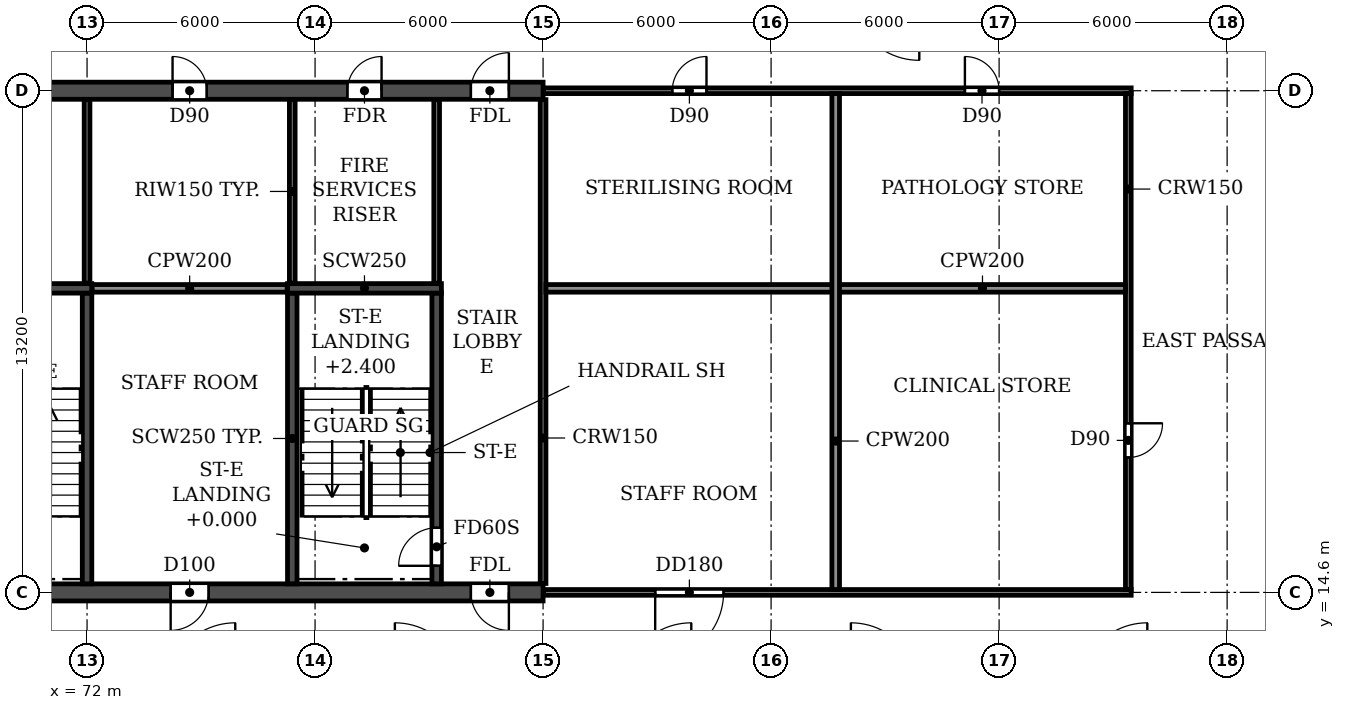
"""IFC4 building model, lengths in metres.
Left out: names, types, materials, properties, quantities, classifications, styles, units other than length and angle.
Written with IfcOpenShell. Run it as: python <this file> out.ifc"""

import sys

from ifc_helpers import new_model, si_unit, direction, frame, frame_2d, origin, place, context, subcontext, project, spatial, rectangle, extrude, element, fill, save


model = new_model("IFC4")
c1 = context("Model", 3, precision=1e-05, world=origin(), true_north=direction((0.0, 1.0)))
c2 = subcontext(c1, "Body", "Model", "MODEL_VIEW")
j1 = project(units=[si_unit("LENGTHUNIT", "METRE"), si_unit("PLANEANGLEUNIT", "RADIAN")], contexts=[c1])
p1 = place(None, origin())
s1 = spatial("IfcSite", under=j1, at=p1, CompositionType="ELEMENT")
p2 = place(p1, origin())
s2 = spatial("IfcBuilding", under=s1, at=p2, CompositionType="ELEMENT")
p3 = place(p2, frame((0.0, 0.0, 6.0)))
s3 = spatial("IfcBuildingStorey", under=s2, at=p3, CompositionType="ELEMENT", Elevation=6.0)
p4 = place(p3, frame((18.0, 14.6, 0.0), z_axis=(0.0, 0.0, 1.0), x_axis=(1.0, 0.0, 0.0)))
e1 = element("IfcWall", 1, at=p4, inside=s3, PredefinedType="SOLIDWALL", context=c2, shape_type="SweptSolid", body=[
    extrude(rectangle(XDim=66.0, YDim=0.45, at=frame_2d((33.0, 0.0))), origin(), (0.0, 0.0, 1.0), 4.52),
])
p5 = place(p4, frame((0.9, 0.0, 0.0)))
e2 = element("IfcOpeningElement", 2, at=p5, cuts=e1, PredefinedType="OPENING", context=c2, shape_type="SweptSolid", body=[
    extrude(rectangle(XDim=1.0, YDim=2.1, at=frame_2d((0.5, 1.05))), frame((0.0, 0.235, 0.0), z_axis=(0.0, -1.0, 0.0), x_axis=(1.0, 0.0, 0.0)), (0.0, 0.0, 1.0), 0.47),
])
p6 = place(p4, frame((8.8, 0.0, 0.0)))
e3 = element("IfcOpeningElement", 3, at=p6, cuts=e1, PredefinedType="OPENING", context=c2, shape_type="SweptSolid", body=[
    extrude(rectangle(XDim=1.0, YDim=2.1, at=frame_2d((0.5, 1.05))), frame((0.0, 0.235, 0.0), z_axis=(0.0, -1.0, 0.0), x_axis=(1.0, 0.0, 0.0)), (0.0, 0.0, 1.0), 0.47),
])
p7 = place(p4, frame((13.4, 0.0, 0.0)))
e4 = element("IfcOpeningElement", 4, at=p7, cuts=e1, PredefinedType="OPENING", context=c2, shape_type="SweptSolid", body=[
    extrude(rectangle(XDim=1.0, YDim=2.1, at=frame_2d((0.5, 1.05))), frame((0.0, 0.235, 0.0), z_axis=(0.0, -1.0, 0.0), x_axis=(1.0, 0.0, 0.0)), (0.0, 0.0, 1.0), 0.47),
])
p8 = place(p4, frame((26.0, 0.0, 0.0)))
e5 = element("IfcOpeningElement", 5, at=p8, cuts=e1, PredefinedType="OPENING", context=c2, shape_type="SweptSolid", body=[
    extrude(rectangle(XDim=1.0, YDim=2.1, at=frame_2d((0.5, 1.05))), frame((0.0, 0.235, 0.0), z_axis=(0.0, -1.0, 0.0), x_axis=(1.0, 0.0, 0.0)), (0.0, 0.0, 1.0), 0.47),
])
p9 = place(p4, frame((29.9, 0.0, 0.0)))
e6 = element("IfcOpeningElement", 6, at=p9, cuts=e1, PredefinedType="OPENING", context=c2, shape_type="SweptSolid", body=[
    extrude(rectangle(XDim=1.0, YDim=2.1, at=frame_2d((0.5, 1.05))), frame((0.0, 0.235, 0.0), z_axis=(0.0, -1.0, 0.0), x_axis=(1.0, 0.0, 0.0)), (0.0, 0.0, 1.0), 0.47),
])
p10 = place(p4, frame((32.5, 0.0, 0.0)))
e7 = element("IfcOpeningElement", 7, at=p10, cuts=e1, PredefinedType="OPENING", context=c2, shape_type="SweptSolid", body=[
    extrude(rectangle(XDim=1.0, YDim=2.1, at=frame_2d((0.5, 1.05))), frame((0.0, 0.235, 0.0), z_axis=(0.0, -1.0, 0.0), x_axis=(1.0, 0.0, 0.0)), (0.0, 0.0, 1.0), 0.47),
])
p11 = place(p4, frame((37.7, 0.0, 0.0)))
e8 = element("IfcOpeningElement", 8, at=p11, cuts=e1, PredefinedType="OPENING", context=c2, shape_type="SweptSolid", body=[
    extrude(rectangle(XDim=1.0, YDim=2.1, at=frame_2d((0.5, 1.05))), frame((0.0, 0.235, 0.0), z_axis=(0.0, -1.0, 0.0), x_axis=(1.0, 0.0, 0.0)), (0.0, 0.0, 1.0), 0.47),
])
p12 = place(p4, frame((51.6, 0.0, 0.0)))
e9 = element("IfcOpeningElement", 9, at=p12, cuts=e1, PredefinedType="OPENING", context=c2, shape_type="SweptSolid", body=[
    extrude(rectangle(XDim=1.0, YDim=2.1, at=frame_2d((0.5, 1.05))), frame((0.0, 0.235, 0.0), z_axis=(0.0, -1.0, 0.0), x_axis=(1.0, 0.0, 0.0)), (0.0, 0.0, 1.0), 0.47),
])
p13 = place(p4, frame((56.2, 0.0, 0.0)))
e10 = element("IfcOpeningElement", 10, at=p13, cuts=e1, PredefinedType="OPENING", context=c2, shape_type="SweptSolid", body=[
    extrude(rectangle(XDim=1.0, YDim=2.1, at=frame_2d((0.5, 1.05))), frame((0.0, 0.235, 0.0), z_axis=(0.0, -1.0, 0.0), x_axis=(1.0, 0.0, 0.0)), (0.0, 0.0, 1.0), 0.47),
])
p14 = place(p4, frame((64.1, 0.0, 0.0)))
e11 = element("IfcOpeningElement", 11, at=p14, cuts=e1, PredefinedType="OPENING", context=c2, shape_type="SweptSolid", body=[
    extrude(rectangle(XDim=1.0, YDim=2.1, at=frame_2d((0.5, 1.05))), frame((0.0, 0.235, 0.0), z_axis=(0.0, -1.0, 0.0), x_axis=(1.0, 0.0, 0.0)), (0.0, 0.0, 1.0), 0.47),
])
p15 = place(p3, frame((18.0, 27.8, 0.0), z_axis=(0.0, 0.0, 1.0), x_axis=(1.0, 0.0, 0.0)))
e12 = element("IfcWall", 12, at=p15, inside=s3, PredefinedType="SOLIDWALL", context=c2, shape_type="SweptSolid", body=[
    extrude(rectangle(XDim=66.0, YDim=0.45, at=frame_2d((33.0, 0.0))), origin(), (0.0, 0.0, 1.0), 4.52),
])
p16 = place(p15, frame((0.9, 0.0, 0.0)))
e13 = element("IfcOpeningElement", 13, at=p16, cuts=e12, PredefinedType="OPENING", context=c2, shape_type="SweptSolid", body=[
    extrude(rectangle(XDim=1.0, YDim=2.1, at=frame_2d((0.5, 1.05))), frame((0.0, 0.235, 0.0), z_axis=(0.0, -1.0, 0.0), x_axis=(1.0, 0.0, 0.0)), (0.0, 0.0, 1.0), 0.47),
])
p17 = place(p15, frame((4.25, 0.0, 0.0)))
e14 = element("IfcOpeningElement", 14, at=p17, cuts=e12, PredefinedType="OPENING", context=c2, shape_type="SweptSolid", body=[
    extrude(rectangle(XDim=0.9, YDim=2.1, at=frame_2d((0.45, 1.05))), frame((0.0, 0.235, 0.0), z_axis=(0.0, -1.0, 0.0), x_axis=(1.0, 0.0, 0.0)), (0.0, 0.0, 1.0), 0.47),
])
p18 = place(p15, frame((8.85, 0.0, 0.0)))
e15 = element("IfcOpeningElement", 15, at=p18, cuts=e12, PredefinedType="OPENING", context=c2, shape_type="SweptSolid", body=[
    extrude(rectangle(XDim=0.9, YDim=2.1, at=frame_2d((0.45, 1.05))), frame((0.0, 0.235, 0.0), z_axis=(0.0, -1.0, 0.0), x_axis=(1.0, 0.0, 0.0)), (0.0, 0.0, 1.0), 0.47),
])
p19 = place(p15, frame((13.45, 0.0, 0.0)))
e16 = element("IfcOpeningElement", 16, at=p19, cuts=e12, PredefinedType="OPENING", context=c2, shape_type="SweptSolid", body=[
    extrude(rectangle(XDim=0.9, YDim=2.1, at=frame_2d((0.45, 1.05))), frame((0.0, 0.235, 0.0), z_axis=(0.0, -1.0, 0.0), x_axis=(1.0, 0.0, 0.0)), (0.0, 0.0, 1.0), 0.47),
])
p20 = place(p15, frame((17.9, 0.0, 0.0)))
e17 = element("IfcOpeningElement", 17, at=p20, cuts=e12, PredefinedType="OPENING", context=c2, shape_type="SweptSolid", body=[
    extrude(rectangle(XDim=1.0, YDim=2.1, at=frame_2d((0.5, 1.05))), frame((0.0, 0.235, 0.0), z_axis=(0.0, -1.0, 0.0), x_axis=(1.0, 0.0, 0.0)), (0.0, 0.0, 1.0), 0.47),
])
p21 = place(p15, frame((23.1, 0.0, 0.0)))
e18 = element("IfcOpeningElement", 18, at=p21, cuts=e12, PredefinedType="OPENING", context=c2, shape_type="SweptSolid", body=[
    extrude(rectangle(XDim=1.0, YDim=2.1, at=frame_2d((0.5, 1.05))), frame((0.0, 0.235, 0.0), z_axis=(0.0, -1.0, 0.0), x_axis=(1.0, 0.0, 0.0)), (0.0, 0.0, 1.0), 0.47),
])
p22 = place(p15, frame((29.6, 0.0, 0.0)))
e19 = element("IfcOpeningElement", 19, at=p22, cuts=e12, PredefinedType="OPENING", context=c2, shape_type="SweptSolid", body=[
    extrude(rectangle(XDim=1.0, YDim=2.1, at=frame_2d((0.5, 1.05))), frame((0.0, 0.235, 0.0), z_axis=(0.0, -1.0, 0.0), x_axis=(1.0, 0.0, 0.0)), (0.0, 0.0, 1.0), 0.47),
])
p23 = place(p15, frame((32.5, 0.0, 0.0)))
e20 = element("IfcOpeningElement", 20, at=p23, cuts=e12, PredefinedType="OPENING", context=c2, shape_type="SweptSolid", body=[
    extrude(rectangle(XDim=1.0, YDim=2.1, at=frame_2d((0.5, 1.05))), frame((0.0, 0.235, 0.0), z_axis=(0.0, -1.0, 0.0), x_axis=(1.0, 0.0, 0.0)), (0.0, 0.0, 1.0), 0.47),
])
p24 = place(p15, frame((38.0, 0.0, 0.0)))
e21 = element("IfcOpeningElement", 21, at=p24, cuts=e12, PredefinedType="OPENING", context=c2, shape_type="SweptSolid", body=[
    extrude(rectangle(XDim=1.0, YDim=2.1, at=frame_2d((0.5, 1.05))), frame((0.0, 0.235, 0.0), z_axis=(0.0, -1.0, 0.0), x_axis=(1.0, 0.0, 0.0)), (0.0, 0.0, 1.0), 0.47),
])
p25 = place(p15, frame((43.2, 0.0, 0.0)))
e22 = element("IfcOpeningElement", 22, at=p25, cuts=e12, PredefinedType="OPENING", context=c2, shape_type="SweptSolid", body=[
    extrude(rectangle(XDim=1.0, YDim=2.1, at=frame_2d((0.5, 1.05))), frame((0.0, 0.235, 0.0), z_axis=(0.0, -1.0, 0.0), x_axis=(1.0, 0.0, 0.0)), (0.0, 0.0, 1.0), 0.47),
])
p26 = place(p15, frame((45.8, 0.0, 0.0)))
e23 = element("IfcOpeningElement", 23, at=p26, cuts=e12, PredefinedType="OPENING", context=c2, shape_type="SweptSolid", body=[
    extrude(rectangle(XDim=1.0, YDim=2.1, at=frame_2d((0.5, 1.05))), frame((0.0, 0.235, 0.0), z_axis=(0.0, -1.0, 0.0), x_axis=(1.0, 0.0, 0.0)), (0.0, 0.0, 1.0), 0.47),
])
p27 = place(p15, frame((48.4, 0.0, 0.0)))
e24 = element("IfcOpeningElement", 24, at=p27, cuts=e12, PredefinedType="OPENING", context=c2, shape_type="SweptSolid", body=[
    extrude(rectangle(XDim=1.0, YDim=2.1, at=frame_2d((0.5, 1.05))), frame((0.0, 0.235, 0.0), z_axis=(0.0, -1.0, 0.0), x_axis=(1.0, 0.0, 0.0)), (0.0, 0.0, 1.0), 0.47),
])
p28 = place(p15, frame((51.65, 0.0, 0.0)))
e25 = element("IfcOpeningElement", 25, at=p28, cuts=e12, PredefinedType="OPENING", context=c2, shape_type="SweptSolid", body=[
    extrude(rectangle(XDim=0.9, YDim=2.1, at=frame_2d((0.45, 1.05))), frame((0.0, 0.235, 0.0), z_axis=(0.0, -1.0, 0.0), x_axis=(1.0, 0.0, 0.0)), (0.0, 0.0, 1.0), 0.47),
])
p29 = place(p15, frame((56.25, 0.0, 0.0)))
e26 = element("IfcOpeningElement", 26, at=p29, cuts=e12, PredefinedType="OPENING", context=c2, shape_type="SweptSolid", body=[
    extrude(rectangle(XDim=0.9, YDim=2.1, at=frame_2d((0.45, 1.05))), frame((0.0, 0.235, 0.0), z_axis=(0.0, -1.0, 0.0), x_axis=(1.0, 0.0, 0.0)), (0.0, 0.0, 1.0), 0.47),
])
p30 = place(p15, frame((60.85, 0.0, 0.0)))
e27 = element("IfcOpeningElement", 27, at=p30, cuts=e12, PredefinedType="OPENING", context=c2, shape_type="SweptSolid", body=[
    extrude(rectangle(XDim=0.9, YDim=2.1, at=frame_2d((0.45, 1.05))), frame((0.0, 0.235, 0.0), z_axis=(0.0, -1.0, 0.0), x_axis=(1.0, 0.0, 0.0)), (0.0, 0.0, 1.0), 0.47),
])
p31 = place(p15, frame((64.1, 0.0, 0.0)))
e28 = element("IfcOpeningElement", 28, at=p31, cuts=e12, PredefinedType="OPENING", context=c2, shape_type="SweptSolid", body=[
    extrude(rectangle(XDim=1.0, YDim=2.1, at=frame_2d((0.5, 1.05))), frame((0.0, 0.235, 0.0), z_axis=(0.0, -1.0, 0.0), x_axis=(1.0, 0.0, 0.0)), (0.0, 0.0, 1.0), 0.47),
])
p32 = place(p3, frame((72.0, 14.825, 0.0), z_axis=(0.0, 0.0, 1.0), x_axis=(0.0, 1.0, 0.0)))
e29 = element("IfcWall", 29, at=p32, inside=s3, PredefinedType="SOLIDWALL", context=c2, shape_type="SweptSolid", body=[
    extrude(rectangle(XDim=7.65, YDim=0.25, at=frame_2d((3.825, 0.0))), origin(), (0.0, 0.0, 1.0), 4.52),
])
p33 = place(p3, frame((68.075, 22.6, 0.0), z_axis=(0.0, 0.0, 1.0), x_axis=(1.0, 0.0, 0.0)))
e30 = element("IfcWall", 30, at=p33, inside=s3, PredefinedType="SOLIDWALL", context=c2, shape_type="SweptSolid", body=[
    extrude(rectangle(XDim=4.05, YDim=0.25, at=frame_2d((2.025, 0.0))), origin(), (0.0, 0.0, 1.0), 4.52),
])
p34 = place(p3, frame((77.4, 14.825, 0.0), z_axis=(0.0, 0.0, 1.0), x_axis=(0.0, 1.0, 0.0)))
e31 = element("IfcWall", 31, at=p34, inside=s3, PredefinedType="SOLIDWALL", context=c2, shape_type="SweptSolid", body=[
    extrude(rectangle(XDim=7.65, YDim=0.25, at=frame_2d((3.825, 0.0))), origin(), (0.0, 0.0, 1.0), 4.52),
])
p35 = place(p3, frame((81.2, 14.825, 0.0), z_axis=(0.0, 0.0, 1.0), x_axis=(0.0, 1.0, 0.0)))
e32 = element("IfcWall", 32, at=p35, inside=s3, PredefinedType="SOLIDWALL", context=c2, shape_type="SweptSolid", body=[
    extrude(rectangle(XDim=7.65, YDim=0.25, at=frame_2d((3.825, 0.0))), origin(), (0.0, 0.0, 1.0), 4.52),
])
p36 = place(p35, frame((0.475, 0.0, 0.0)))
e33 = element("IfcOpeningElement", 33, at=p36, cuts=e32, PredefinedType="OPENING", context=c2, shape_type="SweptSolid", body=[
    extrude(rectangle(XDim=1.0, YDim=2.1, at=frame_2d((0.5, 1.05))), frame((0.0, 0.135, 0.0), z_axis=(0.0, -1.0, 0.0), x_axis=(1.0, 0.0, 0.0)), (0.0, 0.0, 1.0), 0.27),
])
p37 = place(p3, frame((77.275, 22.6, 0.0), z_axis=(0.0, 0.0, 1.0), x_axis=(1.0, 0.0, 0.0)))
e34 = element("IfcWall", 34, at=p37, inside=s3, PredefinedType="SOLIDWALL", context=c2, shape_type="SweptSolid", body=[
    extrude(rectangle(XDim=4.05, YDim=0.25, at=frame_2d((2.025, 0.0))), origin(), (0.0, 0.0, 1.0), 4.52),
])
p38 = place(p3, frame((84.01, 14.6, 0.0), z_axis=(0.0, 0.0, 1.0), x_axis=(1.0, 0.0, 0.0)))
e35 = element("IfcWall", 35, at=p38, inside=s3, PredefinedType="PARTITIONING", context=c2, shape_type="SweptSolid", body=[
    extrude(rectangle(XDim=15.465, YDim=0.15, at=frame_2d((7.732, 0.0))), origin(), (0.0, 0.0, 1.0), 4.52),
])
p39 = place(p38, frame((2.94, 0.0, 0.0)))
e36 = element("IfcOpeningElement", 36, at=p39, cuts=e35, PredefinedType="OPENING", context=c2, shape_type="SweptSolid", body=[
    extrude(rectangle(XDim=1.8, YDim=2.1, at=frame_2d((0.9, 1.05))), frame((0.0, 0.085, 0.0), z_axis=(0.0, -1.0, 0.0), x_axis=(1.0, 0.0, 0.0)), (0.0, 0.0, 1.0), 0.17),
])
p40 = place(p3, frame((84.01, 27.8, 0.0), z_axis=(0.0, 0.0, 1.0), x_axis=(1.0, 0.0, 0.0)))
e37 = element("IfcWall", 37, at=p40, inside=s3, PredefinedType="PARTITIONING", context=c2, shape_type="SweptSolid", body=[
    extrude(rectangle(XDim=15.465, YDim=0.15, at=frame_2d((7.732, 0.0))), origin(), (0.0, 0.0, 1.0), 4.52),
])
p41 = place(p40, frame((3.39, 0.0, 0.0)))
e38 = element("IfcOpeningElement", 38, at=p41, cuts=e37, PredefinedType="OPENING", context=c2, shape_type="SweptSolid", body=[
    extrude(rectangle(XDim=0.9, YDim=2.1, at=frame_2d((0.45, 1.05))), frame((0.0, 0.085, 0.0), z_axis=(0.0, -1.0, 0.0), x_axis=(1.0, 0.0, 0.0)), (0.0, 0.0, 1.0), 0.17),
])
p42 = place(p40, frame((11.09, 0.0, 0.0)))
e39 = element("IfcOpeningElement", 39, at=p42, cuts=e37, PredefinedType="OPENING", context=c2, shape_type="SweptSolid", body=[
    extrude(rectangle(XDim=0.9, YDim=2.1, at=frame_2d((0.45, 1.05))), frame((0.0, 0.085, 0.0), z_axis=(0.0, -1.0, 0.0), x_axis=(1.0, 0.0, 0.0)), (0.0, 0.0, 1.0), 0.17),
])
p43 = place(p3, frame((84.0, 14.835, 0.0), z_axis=(0.0, 0.0, 1.0), x_axis=(0.0, 1.0, 0.0)))
e40 = element("IfcWall", 40, at=p43, inside=s3, PredefinedType="PARTITIONING", context=c2, shape_type="SweptSolid", body=[
    extrude(rectangle(XDim=12.73, YDim=0.15, at=frame_2d((6.365, 0.0))), origin(), (0.0, 0.0, 1.0), 4.52),
])
p44 = place(p3, frame((99.4, 14.675, 0.0), z_axis=(0.0, 0.0, 1.0), x_axis=(0.0, 1.0, 0.0)))
e41 = element("IfcWall", 41, at=p44, inside=s3, PredefinedType="PARTITIONING", context=c2, shape_type="SweptSolid", body=[
    extrude(rectangle(XDim=13.05, YDim=0.15, at=frame_2d((6.525, 0.0))), origin(), (0.0, 0.0, 1.0), 4.52),
])
p45 = place(p44, frame((3.475, 0.0, 0.0)))
e42 = element("IfcOpeningElement", 42, at=p45, cuts=e41, PredefinedType="OPENING", context=c2, shape_type="SweptSolid", body=[
    extrude(rectangle(XDim=0.9, YDim=2.1, at=frame_2d((0.45, 1.05))), frame((0.0, 0.085, 0.0), z_axis=(0.0, -1.0, 0.0), x_axis=(1.0, 0.0, 0.0)), (0.0, 0.0, 1.0), 0.17),
])
p46 = place(p3, frame((72.135, 22.6, 0.0), z_axis=(0.0, 0.0, 1.0), x_axis=(1.0, 0.0, 0.0)))
e43 = element("IfcWall", 43, at=p46, inside=s3, PredefinedType="PARTITIONING", context=c2, shape_type="SweptSolid", body=[
    extrude(rectangle(XDim=5.13, YDim=0.2, at=frame_2d((2.565, 0.0))), origin(), (0.0, 0.0, 1.0), 4.52),
])
p47 = place(p3, frame((84.075, 22.6, 0.0), z_axis=(0.0, 0.0, 1.0), x_axis=(1.0, 0.0, 0.0)))
e44 = element("IfcWall", 44, at=p47, inside=s3, PredefinedType="PARTITIONING", context=c2, shape_type="SweptSolid", body=[
    extrude(rectangle(XDim=15.25, YDim=0.2, at=frame_2d((7.625, 0.0))), origin(), (0.0, 0.0, 1.0), 4.52),
])
p48 = place(p3, frame((91.7, 14.675, 0.0), z_axis=(0.0, 0.0, 1.0), x_axis=(0.0, 1.0, 0.0)))
e45 = element("IfcWall", 45, at=p48, inside=s3, PredefinedType="PARTITIONING", context=c2, shape_type="SweptSolid", body=[
    extrude(rectangle(XDim=13.05, YDim=0.2, at=frame_2d((6.525, 0.0))), origin(), (0.0, 0.0, 1.0), 4.52),
])
for number, where, z_axis, x_axis in (
    (46, (72.0, 22.735, 0.0), (0.0, 0.0, 1.0), (0.0, 1.0, 0.0)),
    (47, (77.4, 22.735, 0.0), (0.0, 0.0, 1.0), (0.0, 1.0, 0.0)),
    (48, (81.2, 22.735, 0.0), (0.0, 0.0, 1.0), (0.0, 1.0, 0.0)),
):
    element("IfcWall", number, at=place(p3, frame(where, z_axis=z_axis, x_axis=x_axis)), inside=s3, PredefinedType="PARTITIONING", context=c2, shape_type="SweptSolid", body=[
        extrude(rectangle(XDim=4.83, YDim=0.15, at=frame_2d((2.415, 0.0))), origin(), (0.0, 0.0, 1.0), 4.52),
    ])
p49 = place(p45, frame((0.9, 0.0, 0.0), z_axis=(0.0, 0.0, 1.0), x_axis=(-1.0, 0.0, 0.0)))
e49 = element("IfcDoor", 49, at=p49, inside=s3, OperationType="SINGLE_SWING_LEFT", PredefinedType="DOOR", context=c2, shape_type="SweptSolid", body=[
    extrude(rectangle(XDim=0.9, YDim=2.1, at=frame_2d((0.45, 1.05))), frame((0.0, 0.025, 0.0), z_axis=(0.0, -1.0, 0.0), x_axis=(1.0, 0.0, 0.0)), (0.0, 0.0, 1.0), 0.05),
])
fill(e42, e49)
p50 = place(p29, origin())
e50 = element("IfcDoor", 50, at=p50, inside=s3, OperationType="SINGLE_SWING_LEFT", PredefinedType="DOOR", context=c2, shape_type="SweptSolid", body=[
    extrude(rectangle(XDim=0.9, YDim=2.1, at=frame_2d((0.45, 1.05))), frame((0.0, 0.025, 0.0), z_axis=(0.0, -1.0, 0.0), x_axis=(1.0, 0.0, 0.0)), (0.0, 0.0, 1.0), 0.05),
])
fill(e26, e50)
p51 = place(p30, origin())
e51 = element("IfcDoor", 51, at=p51, inside=s3, OperationType="SINGLE_SWING_RIGHT", PredefinedType="DOOR", context=c2, shape_type="SweptSolid", body=[
    extrude(rectangle(XDim=0.9, YDim=2.1, at=frame_2d((0.45, 1.05))), frame((0.0, 0.025, 0.0), z_axis=(0.0, -1.0, 0.0), x_axis=(1.0, 0.0, 0.0)), (0.0, 0.0, 1.0), 0.05),
])
fill(e27, e51)
p52 = place(p31, origin())
e52 = element("IfcDoor", 52, at=p52, inside=s3, OperationType="SINGLE_SWING_RIGHT", PredefinedType="DOOR", context=c2, shape_type="SweptSolid", body=[
    extrude(rectangle(XDim=1.0, YDim=2.1, at=frame_2d((0.5, 1.05))), frame((0.0, 0.025, 0.0), z_axis=(0.0, -1.0, 0.0), x_axis=(1.0, 0.0, 0.0)), (0.0, 0.0, 1.0), 0.05),
])
fill(e28, e52)
p53 = place(p41, origin())
e53 = element("IfcDoor", 53, at=p53, inside=s3, OperationType="SINGLE_SWING_RIGHT", PredefinedType="DOOR", context=c2, shape_type="SweptSolid", body=[
    extrude(rectangle(XDim=0.9, YDim=2.1, at=frame_2d((0.45, 1.05))), frame((0.0, 0.025, 0.0), z_axis=(0.0, -1.0, 0.0), x_axis=(1.0, 0.0, 0.0)), (0.0, 0.0, 1.0), 0.05),
])
fill(e38, e53)
p54 = place(p42, origin())
e54 = element("IfcDoor", 54, at=p54, inside=s3, OperationType="SINGLE_SWING_LEFT", PredefinedType="DOOR", context=c2, shape_type="SweptSolid", body=[
    extrude(rectangle(XDim=0.9, YDim=2.1, at=frame_2d((0.45, 1.05))), frame((0.0, 0.025, 0.0), z_axis=(0.0, -1.0, 0.0), x_axis=(1.0, 0.0, 0.0)), (0.0, 0.0, 1.0), 0.05),
])
fill(e39, e54)
p55 = place(p13, frame((1.0, 0.0, 0.0), z_axis=(0.0, 0.0, 1.0), x_axis=(-1.0, 0.0, 0.0)))
e55 = element("IfcDoor", 55, at=p55, inside=s3, OperationType="SINGLE_SWING_RIGHT", PredefinedType="DOOR", context=c2, shape_type="SweptSolid", body=[
    extrude(rectangle(XDim=1.0, YDim=2.1, at=frame_2d((0.5, 1.05))), frame((0.0, 0.025, 0.0), z_axis=(0.0, -1.0, 0.0), x_axis=(1.0, 0.0, 0.0)), (0.0, 0.0, 1.0), 0.05),
])
fill(e10, e55)
p56 = place(p14, frame((1.0, 0.0, 0.0), z_axis=(0.0, 0.0, 1.0), x_axis=(-1.0, 0.0, 0.0)))
e56 = element("IfcDoor", 56, at=p56, inside=s3, OperationType="SINGLE_SWING_LEFT", PredefinedType="DOOR", context=c2, shape_type="SweptSolid", body=[
    extrude(rectangle(XDim=1.0, YDim=2.1, at=frame_2d((0.5, 1.05))), frame((0.0, 0.025, 0.0), z_axis=(0.0, -1.0, 0.0), x_axis=(1.0, 0.0, 0.0)), (0.0, 0.0, 1.0), 0.05),
])
fill(e11, e56)
p57 = place(p39, frame((1.8, 0.0, 0.0), z_axis=(0.0, 0.0, 1.0), x_axis=(-1.0, 0.0, 0.0)))
e57 = element("IfcDoor", 57, at=p57, inside=s3, OperationType="DOUBLE_DOOR_SINGLE_SWING", PredefinedType="DOOR", context=c2, shape_type="SweptSolid", body=[
    extrude(rectangle(XDim=1.8, YDim=2.1, at=frame_2d((0.9, 1.05))), frame((0.0, 0.025, 0.0), z_axis=(0.0, -1.0, 0.0), x_axis=(1.0, 0.0, 0.0)), (0.0, 0.0, 1.0), 0.05),
])
fill(e36, e57)
p58 = place(p36, origin())
e58 = element("IfcDoor", 58, at=p58, inside=s3, OperationType="SINGLE_SWING_LEFT", PredefinedType="DOOR", context=c2, shape_type="SweptSolid", body=[
    extrude(rectangle(XDim=1.0, YDim=2.1, at=frame_2d((0.5, 1.05))), frame((0.0, 0.025, 0.0), z_axis=(0.0, -1.0, 0.0), x_axis=(1.0, 0.0, 0.0)), (0.0, 0.0, 1.0), 0.05),
])
fill(e33, e58)
save(model, sys.argv[1])
